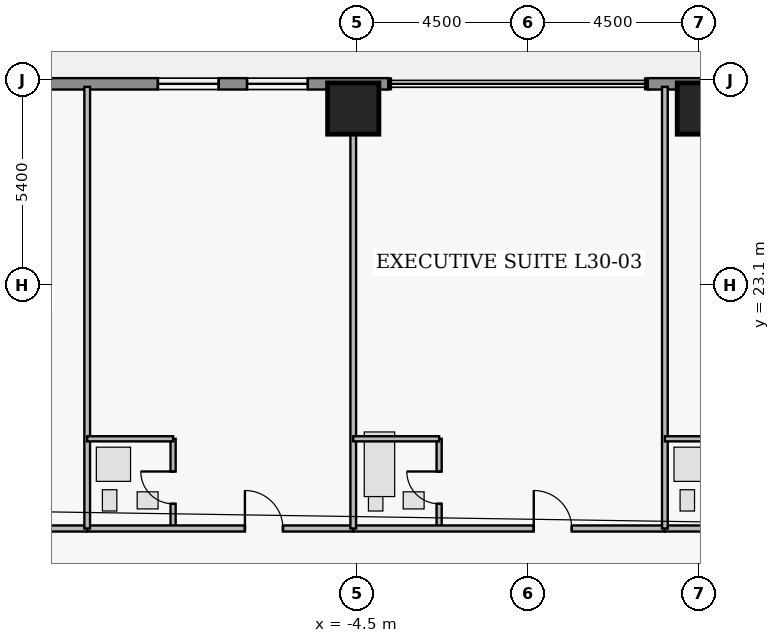
"""IFC4 building model, lengths in metres.
Left out: names, types, materials, properties, quantities, classifications, styles, units other than length and angle.
Written with IfcOpenShell. Run it as: python <this file> out.ifc"""

import sys

from ifc_helpers import new_model, si_unit, direction, frame, frame_2d, origin, origin_2d, place, context, subcontext, project, spatial, rectangle, extrude, element, fill, save


model = new_model("IFC4")
c1 = context("Model", 3, precision=1e-05, world=origin(), true_north=direction((0.0, 1.0)))
c2 = subcontext(c1, "Body", "Model", "MODEL_VIEW")
j1 = project(units=[si_unit("LENGTHUNIT", "METRE"), si_unit("PLANEANGLEUNIT", "RADIAN")], contexts=[c1])
p1 = place(None, origin())
s1 = spatial("IfcSite", under=j1, at=p1, CompositionType="ELEMENT")
p2 = place(p1, origin())
s2 = spatial("IfcBuilding", under=s1, at=p2, CompositionType="ELEMENT")
p3 = place(p2, frame((0.0, 0.0, 121.2)))
s3 = spatial("IfcBuildingStorey", under=s2, at=p3, CompositionType="ELEMENT", Elevation=121.2)
for number, where, z_axis, x_axis in (
    (1, (-4.6, 27.75, 0.0), (0.0, 0.0, 1.0), (1.0, 0.0, 0.0)),
    (2, (4.6, 27.75, 0.0), (0.0, 0.0, 1.0), (1.0, 0.0, 0.0)),
):
    element("IfcColumn", number, at=place(p3, frame(where, z_axis=z_axis, x_axis=x_axis)), inside=s3, PredefinedType="COLUMN", context=c2, shape_type="SweptSolid", body=[
        extrude(rectangle(XDim=1.35, YDim=1.35, at=origin_2d()), origin(), (0.0, 0.0, 1.0), 3.65),
    ])
p4 = place(p3, frame((-14.72, 28.4, 0.0), z_axis=(0.0, 0.0, 1.0), x_axis=(1.0, 0.0, 0.0)))
e3 = element("IfcWall", 3, at=p4, inside=s3, PredefinedType="STANDARD", context=c2, shape_type="SweptSolid", body=[
    extrude(rectangle(XDim=11.04, YDim=0.3, at=frame_2d((5.52, 0.0))), origin(), (0.0, 0.0, 1.0), 3.43),
])
p5 = place(p4, frame((4.98, 0.0, 0.85)))
e4 = element("IfcOpeningElement", 4, at=p5, cuts=e3, PredefinedType="OPENING", context=c2, shape_type="SweptSolid", body=[
    extrude(rectangle(XDim=1.6, YDim=1.8, at=frame_2d((0.8, 0.9))), frame((0.0, 0.16, 0.0), z_axis=(0.0, -1.0, 0.0), x_axis=(1.0, 0.0, 0.0)), (0.0, 0.0, 1.0), 0.32),
])
p6 = place(p4, frame((7.325, 0.0, 0.85)))
e5 = element("IfcOpeningElement", 5, at=p6, cuts=e3, PredefinedType="OPENING", context=c2, shape_type="SweptSolid", body=[
    extrude(rectangle(XDim=1.6, YDim=1.8, at=frame_2d((0.8, 0.9))), frame((0.0, 0.16, 0.0), z_axis=(0.0, -1.0, 0.0), x_axis=(1.0, 0.0, 0.0)), (0.0, 0.0, 1.0), 0.32),
])
p7 = place(p3, frame((3.15, 28.4, 0.0), z_axis=(0.0, 0.0, 1.0), x_axis=(1.0, 0.0, 0.0)))
e6 = element("IfcWall", 6, at=p7, inside=s3, PredefinedType="STANDARD", context=c2, shape_type="SweptSolid", body=[
    extrude(rectangle(XDim=2.37, YDim=0.3, at=frame_2d((1.185, 0.0))), origin(), (0.0, 0.0, 1.0), 3.43),
])
p8 = place(p3, frame((-20.6, 16.7, 0.0), z_axis=(0.0, 0.0, 1.0), x_axis=(1.0, 0.0, 0.0)))
e7 = element("IfcWall", 7, at=p8, inside=s3, PredefinedType="PARTITIONING", context=c2, shape_type="SweptSolid", body=[
    extrude(rectangle(XDim=9.0, YDim=0.16, at=frame_2d((4.5, 0.0))), origin(), (0.0, 0.0, 1.0), 2.973),
])
p9 = place(p8, frame((5.15, 0.0, 0.0)))
e8 = element("IfcOpeningElement", 8, at=p9, cuts=e7, PredefinedType="OPENING", context=c2, shape_type="SweptSolid", body=[
    extrude(rectangle(XDim=1.0, YDim=2.15, at=frame_2d((0.5, 1.075))), frame((0.0, 0.09, 0.0), z_axis=(0.0, -1.0, 0.0), x_axis=(1.0, 0.0, 0.0)), (0.0, 0.0, 1.0), 0.18),
])
p10 = place(p3, frame((-9.34, 16.7, 0.0), z_axis=(0.0, 0.0, 1.0), x_axis=(0.0, 1.0, 0.0)))
e9 = element("IfcWall", 9, at=p10, inside=s3, PredefinedType="PLUMBINGWALL", context=c2, shape_type="SweptSolid", body=[
    extrude(rectangle(XDim=2.36, YDim=0.135, at=frame_2d((1.18, 0.0))), origin(), (0.0, 0.0, 1.0), 3.43),
])
p11 = place(p10, frame((0.65, 0.0, 0.0)))
e10 = element("IfcOpeningElement", 10, at=p11, cuts=e9, PredefinedType="OPENING", context=c2, shape_type="SweptSolid", body=[
    extrude(rectangle(XDim=0.85, YDim=2.1, at=frame_2d((0.425, 1.05))), frame((0.0, 0.077, 0.0), z_axis=(0.0, -1.0, 0.0), x_axis=(1.0, 0.0, 0.0)), (0.0, 0.0, 1.0), 0.155),
])
p12 = place(p3, frame((-11.6, 16.7, 0.0), z_axis=(0.0, 0.0, 1.0), x_axis=(1.0, 0.0, 0.0)))
e11 = element("IfcWall", 11, at=p12, inside=s3, PredefinedType="PARTITIONING", context=c2, shape_type="SweptSolid", body=[
    extrude(rectangle(XDim=7.0, YDim=0.16, at=frame_2d((3.5, 0.0))), origin(), (0.0, 0.0, 1.0), 2.973),
])
p13 = place(p12, frame((4.15, 0.0, 0.0)))
e12 = element("IfcOpeningElement", 12, at=p13, cuts=e11, PredefinedType="OPENING", context=c2, shape_type="SweptSolid", body=[
    extrude(rectangle(XDim=1.0, YDim=2.15, at=frame_2d((0.5, 1.075))), frame((0.0, 0.09, 0.0), z_axis=(0.0, -1.0, 0.0), x_axis=(1.0, 0.0, 0.0)), (0.0, 0.0, 1.0), 0.18),
])
p14 = place(p3, frame((-2.34, 16.7, 0.0), z_axis=(0.0, 0.0, 1.0), x_axis=(0.0, 1.0, 0.0)))
e13 = element("IfcWall", 13, at=p14, inside=s3, PredefinedType="PLUMBINGWALL", context=c2, shape_type="SweptSolid", body=[
    extrude(rectangle(XDim=2.36, YDim=0.135, at=frame_2d((1.18, 0.0))), origin(), (0.0, 0.0, 1.0), 3.43),
])
p15 = place(p14, frame((0.65, 0.0, 0.0)))
e14 = element("IfcOpeningElement", 14, at=p15, cuts=e13, PredefinedType="OPENING", context=c2, shape_type="SweptSolid", body=[
    extrude(rectangle(XDim=0.85, YDim=2.1, at=frame_2d((0.425, 1.05))), frame((0.0, 0.077, 0.0), z_axis=(0.0, -1.0, 0.0), x_axis=(1.0, 0.0, 0.0)), (0.0, 0.0, 1.0), 0.155),
])
p16 = place(p3, frame((-4.6, 16.7, 0.0), z_axis=(0.0, 0.0, 1.0), x_axis=(1.0, 0.0, 0.0)))
e15 = element("IfcWall", 15, at=p16, inside=s3, PredefinedType="PARTITIONING", context=c2, shape_type="SweptSolid", body=[
    extrude(rectangle(XDim=8.2, YDim=0.16, at=frame_2d((4.1, 0.0))), origin(), (0.0, 0.0, 1.0), 2.973),
])
p17 = place(p16, frame((4.75, 0.0, 0.0)))
e16 = element("IfcOpeningElement", 16, at=p17, cuts=e15, PredefinedType="OPENING", context=c2, shape_type="SweptSolid", body=[
    extrude(rectangle(XDim=1.0, YDim=2.15, at=frame_2d((0.5, 1.075))), frame((0.0, 0.09, 0.0), z_axis=(0.0, -1.0, 0.0), x_axis=(1.0, 0.0, 0.0)), (0.0, 0.0, 1.0), 0.18),
])
p18 = place(p3, frame((3.6, 16.7, 0.0), z_axis=(0.0, 0.0, 1.0), x_axis=(1.0, 0.0, 0.0)))
e17 = element("IfcWall", 17, at=p18, inside=s3, PredefinedType="PARTITIONING", context=c2, shape_type="SweptSolid", body=[
    extrude(rectangle(XDim=7.8, YDim=0.16, at=frame_2d((3.9, 0.0))), origin(), (0.0, 0.0, 1.0), 2.973),
])
p19 = place(p18, frame((4.55, 0.0, 0.0)))
e18 = element("IfcOpeningElement", 18, at=p19, cuts=e17, PredefinedType="OPENING", context=c2, shape_type="SweptSolid", body=[
    extrude(rectangle(XDim=1.0, YDim=2.15, at=frame_2d((0.5, 1.075))), frame((0.0, 0.09, 0.0), z_axis=(0.0, -1.0, 0.0), x_axis=(1.0, 0.0, 0.0)), (0.0, 0.0, 1.0), 0.18),
])
p20 = place(p3, frame((-11.6, 16.7, 0.0), z_axis=(0.0, 0.0, 1.0), x_axis=(0.0, 1.0, 0.0)))
e19 = element("IfcWall", 19, at=p20, inside=s3, PredefinedType="PARTITIONING", context=c2, shape_type="SweptSolid", body=[
    extrude(rectangle(XDim=11.62, YDim=0.15, at=frame_2d((5.81, 0.0))), origin(), (0.0, 0.0, 1.0), 3.43),
])
p21 = place(p3, frame((-11.6, 19.06, 0.0), z_axis=(0.0, 0.0, 1.0), x_axis=(1.0, 0.0, 0.0)))
e20 = element("IfcWall", 20, at=p21, inside=s3, PredefinedType="PLUMBINGWALL", context=c2, shape_type="SweptSolid", body=[
    extrude(rectangle(XDim=2.26, YDim=0.135, at=frame_2d((1.13, 0.0))), origin(), (0.0, 0.0, 1.0), 2.973),
])
p22 = place(p3, frame((-4.6, 16.7, 0.0), z_axis=(0.0, 0.0, 1.0), x_axis=(0.0, 1.0, 0.0)))
e21 = element("IfcWall", 21, at=p22, inside=s3, PredefinedType="PARTITIONING", context=c2, shape_type="SweptSolid", body=[
    extrude(rectangle(XDim=11.62, YDim=0.15, at=frame_2d((5.81, 0.0))), origin(), (0.0, 0.0, 1.0), 2.503),
])
p23 = place(p3, frame((-4.6, 19.06, 0.0), z_axis=(0.0, 0.0, 1.0), x_axis=(1.0, 0.0, 0.0)))
e22 = element("IfcWall", 22, at=p23, inside=s3, PredefinedType="PLUMBINGWALL", context=c2, shape_type="SweptSolid", body=[
    extrude(rectangle(XDim=2.26, YDim=0.135, at=frame_2d((1.13, 0.0))), origin(), (0.0, 0.0, 1.0), 2.973),
])
p24 = place(p3, frame((3.6, 16.7, 0.0), z_axis=(0.0, 0.0, 1.0), x_axis=(0.0, 1.0, 0.0)))
e23 = element("IfcWall", 23, at=p24, inside=s3, PredefinedType="PARTITIONING", context=c2, shape_type="SweptSolid", body=[
    extrude(rectangle(XDim=11.62, YDim=0.15, at=frame_2d((5.81, 0.0))), origin(), (0.0, 0.0, 1.0), 3.43),
])
p25 = place(p3, frame((3.6, 19.06, 0.0), z_axis=(0.0, 0.0, 1.0), x_axis=(1.0, 0.0, 0.0)))
e24 = element("IfcWall", 24, at=p25, inside=s3, PredefinedType="PLUMBINGWALL", context=c2, shape_type="SweptSolid", body=[
    extrude(rectangle(XDim=2.26, YDim=0.135, at=frame_2d((1.13, 0.0))), origin(), (0.0, 0.0, 1.0), 2.973),
])
p26 = place(p5, origin())
e25 = element("IfcWindow", 25, at=p26, inside=s3, PartitioningType="SINGLE_PANEL", PredefinedType="WINDOW", context=c2, shape_type="SweptSolid", body=[
    extrude(rectangle(XDim=1.6, YDim=1.8, at=frame_2d((0.8, 0.9))), frame((0.0, 0.03, 0.0), z_axis=(0.0, -1.0, 0.0), x_axis=(1.0, 0.0, 0.0)), (0.0, 0.0, 1.0), 0.06),
])
fill(e4, e25)
p27 = place(p6, origin())
e26 = element("IfcWindow", 26, at=p27, inside=s3, PartitioningType="SINGLE_PANEL", PredefinedType="WINDOW", context=c2, shape_type="SweptSolid", body=[
    extrude(rectangle(XDim=1.6, YDim=1.8, at=frame_2d((0.8, 0.9))), frame((0.0, 0.03, 0.0), z_axis=(0.0, -1.0, 0.0), x_axis=(1.0, 0.0, 0.0)), (0.0, 0.0, 1.0), 0.06),
])
fill(e5, e26)
p28 = place(p11, origin())
e27 = element("IfcDoor", 27, at=p28, inside=s3, OperationType="SINGLE_SWING_RIGHT", PredefinedType="DOOR", context=c2, shape_type="SweptSolid", body=[
    extrude(rectangle(XDim=0.85, YDim=2.1, at=frame_2d((0.425, 1.05))), frame((0.0, 0.025, 0.0), z_axis=(0.0, -1.0, 0.0), x_axis=(1.0, 0.0, 0.0)), (0.0, 0.0, 1.0), 0.05),
])
fill(e10, e27)
p29 = place(p13, origin())
e28 = element("IfcDoor", 28, at=p29, inside=s3, OperationType="SINGLE_SWING_LEFT", PredefinedType="DOOR", context=c2, shape_type="SweptSolid", body=[
    extrude(rectangle(XDim=1.0, YDim=2.15, at=frame_2d((0.5, 1.075))), frame((0.0, 0.025, 0.0), z_axis=(0.0, -1.0, 0.0), x_axis=(1.0, 0.0, 0.0)), (0.0, 0.0, 1.0), 0.05),
])
fill(e12, e28)
p30 = place(p15, origin())
e29 = element("IfcDoor", 29, at=p30, inside=s3, OperationType="SINGLE_SWING_RIGHT", PredefinedType="DOOR", context=c2, shape_type="SweptSolid", body=[
    extrude(rectangle(XDim=0.85, YDim=2.1, at=frame_2d((0.425, 1.05))), frame((0.0, 0.025, 0.0), z_axis=(0.0, -1.0, 0.0), x_axis=(1.0, 0.0, 0.0)), (0.0, 0.0, 1.0), 0.05),
])
fill(e14, e29)
p31 = place(p17, origin())
e30 = element("IfcDoor", 30, at=p31, inside=s3, OperationType="SINGLE_SWING_LEFT", PredefinedType="DOOR", context=c2, shape_type="SweptSolid", body=[
    extrude(rectangle(XDim=1.0, YDim=2.15, at=frame_2d((0.5, 1.075))), frame((0.0, 0.025, 0.0), z_axis=(0.0, -1.0, 0.0), x_axis=(1.0, 0.0, 0.0)), (0.0, 0.0, 1.0), 0.05),
])
fill(e16, e30)
save(model, sys.argv[1])
